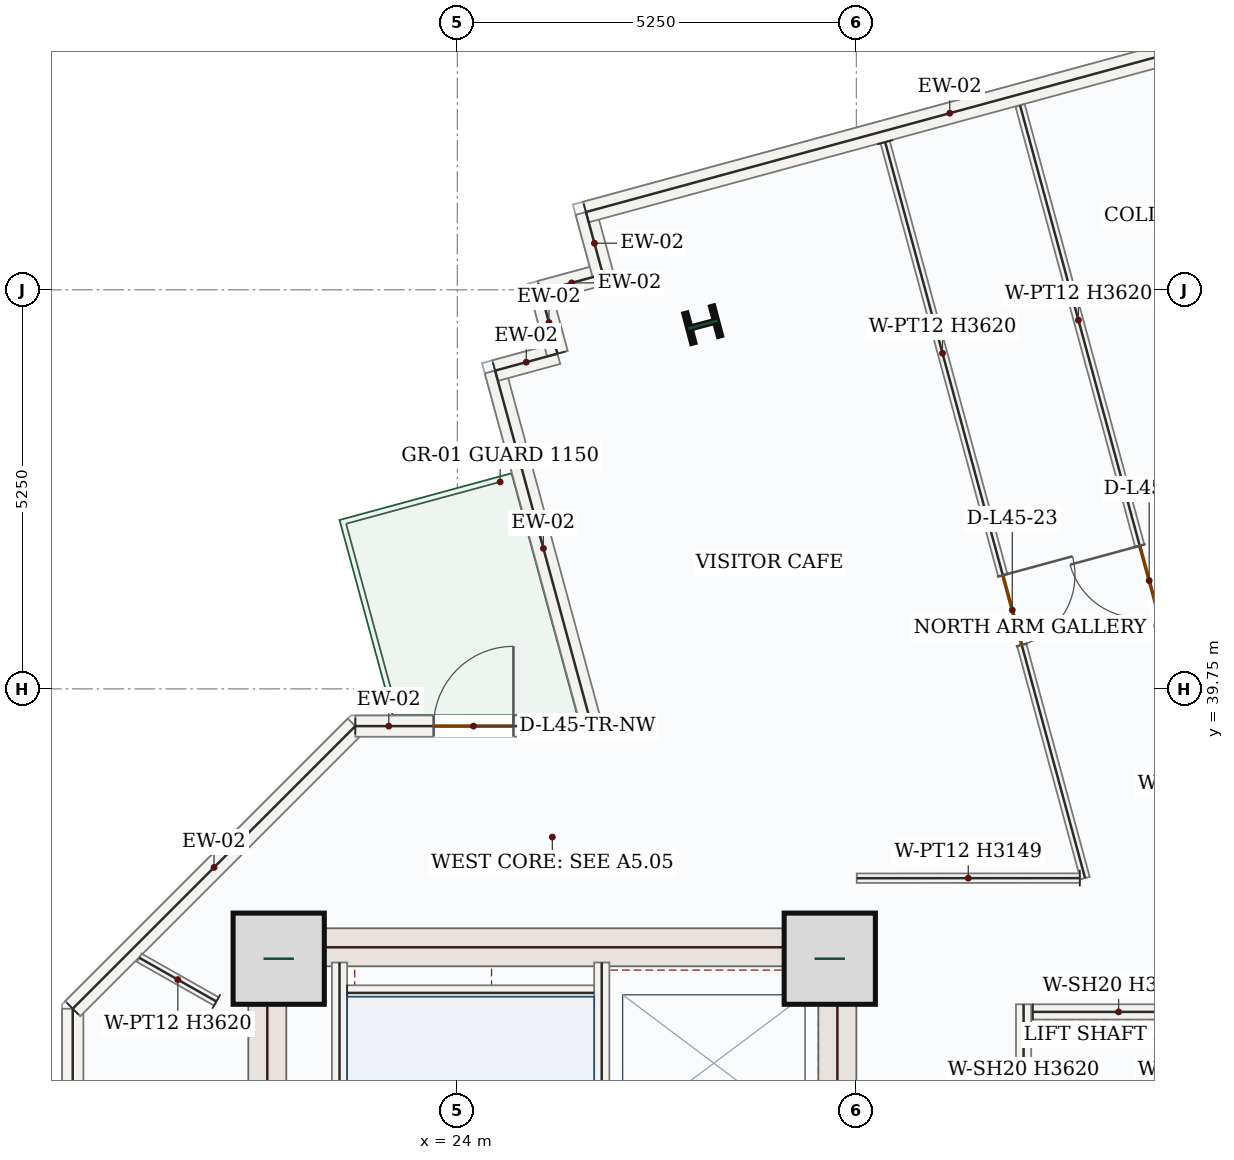
"""IFC4 building model, lengths in metres.
Left out: names, types, materials, properties, quantities, classifications, styles, units other than length and angle.
Written with IfcOpenShell. Run it as: python <this file> out.ifc"""

import sys

from ifc_helpers import new_model, si_unit, direction, frame, frame_2d, origin, origin_2d, place, context, subcontext, project, spatial, rectangle, i_section, extrude, source, transform, mapped, element, fill, save


model = new_model("IFC4")
c1 = context("Model", 3, precision=1e-05, world=origin(), true_north=direction((0.0, 1.0)))
c2 = subcontext(c1, "Body", "Model", "MODEL_VIEW")
j1 = project(units=[si_unit("LENGTHUNIT", "METRE"), si_unit("PLANEANGLEUNIT", "RADIAN")], contexts=[c1])
p1 = place(None, origin())
s1 = spatial("IfcSite", under=j1, at=p1, CompositionType="ELEMENT")
p2 = place(p1, origin())
s2 = spatial("IfcBuilding", under=s1, at=p2, CompositionType="ELEMENT")
p3 = place(p2, frame((0.0, 0.0, 194.1)))
s3 = spatial("IfcBuildingStorey", under=s2, at=p3, CompositionType="ELEMENT", Elevation=194.1)
m1 = source(origin(), c2, "Body", "SweptSolid", [
    extrude(rectangle(XDim=8.55, YDim=0.5, at=frame_2d((4.275, 0.0))), origin(), (0.0, 0.0, 1.0), 3.62),
])
p4 = place(p3, frame((21.5, 28.05, 0.0), z_axis=(0.0, 0.0, 1.0), x_axis=(0.0, 1.0, 0.0)))
e1 = element("IfcWall", 1, at=p4, inside=s3, PredefinedType="SHEAR", context=c2, shape_type="MappedRepresentation", body=[
    mapped(m1, transform((0.0, 0.0, 0.0), x_axis=(1.0, 0.0, 0.0), y_axis=(0.0, 1.0, 0.0), z_axis=(0.0, 0.0, 1.0), scale=1.0)),
])
p5 = place(p3, frame((29.0, 28.05, 0.0), z_axis=(0.0, 0.0, 1.0), x_axis=(0.0, 1.0, 0.0)))
e2 = element("IfcWall", 2, at=p5, inside=s3, PredefinedType="SHEAR", context=c2, shape_type="SweptSolid", body=[
    extrude(rectangle(XDim=8.55, YDim=0.5, at=frame_2d((4.275, 0.0))), origin(), (0.0, 0.0, 1.0), 3.62),
])
p6 = place(p5, frame((1.5, 0.0, 0.0)))
e3 = element("IfcOpeningElement", 3, at=p6, cuts=e2, PredefinedType="OPENING", context=c2, shape_type="SweptSolid", body=[
    extrude(rectangle(XDim=1.1, YDim=2.2, at=frame_2d((0.55, 1.1))), frame((0.0, 0.26, 0.0), z_axis=(0.0, -1.0, 0.0), x_axis=(1.0, 0.0, 0.0)), (0.0, 0.0, 1.0), 0.52),
])
m2 = source(origin(), c2, "Body", "SweptSolid", [
    extrude(rectangle(XDim=7.0, YDim=0.5, at=frame_2d((3.5, 0.0))), origin(), (0.0, 0.0, 1.0), 3.62),
])
p7 = place(p3, frame((21.75, 36.35, 0.0), z_axis=(0.0, 0.0, 1.0), x_axis=(1.0, 0.0, 0.0)))
e4 = element("IfcWall", 4, at=p7, inside=s3, PredefinedType="SHEAR", context=c2, shape_type="MappedRepresentation", body=[
    mapped(m2, transform((0.0, 0.0, 0.0), x_axis=(1.0, 0.0, 0.0), y_axis=(0.0, 1.0, 0.0), z_axis=(0.0, 0.0, 1.0), scale=1.0)),
])
m3 = source(origin(), c2, "Body", "SweptSolid", [
    extrude(rectangle(XDim=1.2, YDim=1.2, at=origin_2d()), origin(), (0.0, 0.0, 1.0), 3.9),
])
for number, where, z_axis, x_axis in (
    (5, (21.65, 36.2, 0.0), (0.0, 0.0, 1.0), (1.0, 0.0, 0.0)),
    (6, (28.9, 36.2, 0.0), (0.0, 0.0, 1.0), (1.0, 0.0, 0.0)),
):
    element("IfcColumn", number, at=place(p3, frame(where, z_axis=z_axis, x_axis=x_axis)), inside=s3, PredefinedType="COLUMN", context=c2, shape_type="MappedRepresentation", body=[
        mapped(m3, transform((0.0, 0.0, 0.0), x_axis=(1.0, 0.0, 0.0), y_axis=(0.0, 1.0, 0.0), z_axis=(0.0, 0.0, 1.0), scale=1.0)),
    ])
m4 = source(origin(), c2, "Body", "SweptSolid", [
    extrude(i_section(OverallWidth=0.404, OverallDepth=0.407, WebThickness=0.027, FlangeThickness=0.044, FilletRadius=0.018, at=origin_2d()), origin(), (0.0, 0.0, 1.0), 3.9),
])
p8 = place(p3, frame((27.228, 44.541, 0.0), z_axis=(0.0, 0.0, 1.0), x_axis=(-0.255445757936, 0.966823388604, 0.0)))
e7 = element("IfcColumn", 7, at=p8, inside=s3, PredefinedType="COLUMN", context=c2, shape_type="MappedRepresentation", body=[
    mapped(m4, transform((0.0, 0.0, 0.0), x_axis=(1.0, 0.0, 0.0), y_axis=(0.0, 1.0, 0.0), z_axis=(0.0, 0.0, 1.0), scale=1.0)),
])
m5 = source(origin(), c2, "Body", "SweptSolid", [
    extrude(rectangle(XDim=6.276, YDim=0.28, at=frame_2d((3.138, 0.0))), origin(), (0.0, 0.0, 1.0), 3.62),
])
p9 = place(p3, frame((18.94, 29.266, 0.0), z_axis=(0.0, 0.0, 1.0), x_axis=(0.0, 1.0, 0.0)))
e8 = element("IfcWall", 8, at=p9, inside=s3, PredefinedType="SOLIDWALL", context=c2, shape_type="MappedRepresentation", body=[
    mapped(m5, transform((0.0, 0.0, 0.0), x_axis=(1.0, 0.0, 0.0), y_axis=(0.0, 1.0, 0.0), z_axis=(0.0, 0.0, 1.0), scale=1.0)),
])
m6 = source(origin(), c2, "Body", "SweptSolid", [
    extrude(rectangle(XDim=5.258, YDim=0.28, at=frame_2d((2.629, 0.0))), origin(), (0.0, 0.0, 1.0), 3.62),
])
p10 = place(p3, frame((18.94, 35.542, 0.0), z_axis=(0.0, 0.0, 1.0), x_axis=(0.707106781187, 0.707106781187, 0.0)))
e9 = element("IfcWall", 9, at=p10, inside=s3, PredefinedType="SOLIDWALL", context=c2, shape_type="MappedRepresentation", body=[
    mapped(m6, transform((0.0, 0.0, 0.0), x_axis=(1.0, 0.0, 0.0), y_axis=(0.0, 1.0, 0.0), z_axis=(0.0, 0.0, 1.0), scale=1.0)),
])
p11 = place(p3, frame((22.658, 39.26, 0.0), z_axis=(0.0, 0.0, 1.0), x_axis=(1.0, 0.0, 0.0)))
e10 = element("IfcWall", 10, at=p11, inside=s3, PredefinedType="SOLIDWALL", context=c2, shape_type="SweptSolid", body=[
    extrude(rectangle(XDim=3.11, YDim=0.28, at=frame_2d((1.555, 0.0))), origin(), (0.0, 0.0, 1.0), 3.62),
])
p12 = place(p11, frame((1.03, 0.0, 0.0)))
e11 = element("IfcOpeningElement", 11, at=p12, cuts=e10, PredefinedType="OPENING", context=c2, shape_type="SweptSolid", body=[
    extrude(rectangle(XDim=1.05, YDim=2.15, at=frame_2d((0.525, 1.075))), frame((0.0, 0.15, 0.0), z_axis=(0.0, -1.0, 0.0), x_axis=(1.0, 0.0, 0.0)), (0.0, 0.0, 1.0), 0.3),
])
m7 = source(origin(), c2, "Body", "SweptSolid", [
    extrude(rectangle(XDim=4.846, YDim=0.28, at=frame_2d((2.423, 0.0))), origin(), (0.0, 0.0, 1.0), 3.62),
])
p13 = place(p3, frame((25.768, 39.26, 0.0), z_axis=(0.0, 0.0, 1.0), x_axis=(-0.262175182741, 0.965020296965, 0.0)))
e12 = element("IfcWall", 12, at=p13, inside=s3, PredefinedType="SOLIDWALL", context=c2, shape_type="MappedRepresentation", body=[
    mapped(m7, transform((0.0, 0.0, 0.0), x_axis=(1.0, 0.0, 0.0), y_axis=(0.0, 1.0, 0.0), z_axis=(0.0, 0.0, 1.0), scale=1.0)),
])
m8 = source(origin(), c2, "Body", "SweptSolid", [
    extrude(rectangle(XDim=0.85, YDim=0.28, at=frame_2d((0.425, 0.0))), origin(), (0.0, 0.0, 1.0), 3.62),
])
for number, where, z_axis, x_axis in (
    (13, (24.497, 43.937, 0.0), (0.0, 0.0, 1.0), (0.965, 0.262, 0.0)),
    (14, (25.317, 44.159, 0.0), (0.0, 0.0, 1.0), (-0.262, 0.965, 0.0)),
    (15, (25.094, 44.98, 0.0), (0.0, 0.0, 1.0), (0.965, 0.262, 0.0)),
    (16, (25.915, 45.202, 0.0), (0.0, 0.0, 1.0), (-0.262, 0.965, 0.0)),
):
    element("IfcWall", number, at=place(p3, frame(where, z_axis=z_axis, x_axis=x_axis)), inside=s3, PredefinedType="SOLIDWALL", context=c2, shape_type="MappedRepresentation", body=[
        mapped(m8, transform((0.0, 0.0, 0.0), x_axis=(1.0, 0.0, 0.0), y_axis=(0.0, 1.0, 0.0), z_axis=(0.0, 0.0, 1.0), scale=1.0)),
    ])
m9 = source(origin(), c2, "Body", "SweptSolid", [
    extrude(rectangle(XDim=9.92, YDim=0.28, at=frame_2d((4.96, 0.0))), origin(), (0.0, 0.0, 1.0), 3.62),
])
p14 = place(p3, frame((25.692, 46.023, 0.0), z_axis=(0.0, 0.0, 1.0), x_axis=(0.965012714082, 0.262203092393, 0.0)))
e17 = element("IfcWall", 17, at=p14, inside=s3, PredefinedType="SOLIDWALL", context=c2, shape_type="MappedRepresentation", body=[
    mapped(m9, transform((0.0, 0.0, 0.0), x_axis=(1.0, 0.0, 0.0), y_axis=(0.0, 1.0, 0.0), z_axis=(0.0, 0.0, 1.0), scale=1.0)),
])
m10 = source(origin(), c2, "Body", "SweptSolid", [
    extrude(rectangle(XDim=7.87, YDim=0.2, at=frame_2d((3.935, 0.0))), origin(), (0.0, 0.0, 1.0), 3.62),
])
p15 = place(p3, frame((22.45, 28.28, 0.0), z_axis=(0.0, 0.0, 1.0), x_axis=(0.0, 1.0, 0.0)))
e18 = element("IfcWall", 18, at=p15, inside=s3, PredefinedType="SOLIDWALL", context=c2, shape_type="MappedRepresentation", body=[
    mapped(m10, transform((0.0, 0.0, 0.0), x_axis=(1.0, 0.0, 0.0), y_axis=(0.0, 1.0, 0.0), z_axis=(0.0, 0.0, 1.0), scale=1.0)),
])
p16 = place(p3, frame((25.9, 28.15, 0.0), z_axis=(0.0, 0.0, 1.0), x_axis=(0.0, 1.0, 0.0)))
e19 = element("IfcWall", 19, at=p16, inside=s3, PredefinedType="SOLIDWALL", context=c2, shape_type="SweptSolid", body=[
    extrude(rectangle(XDim=8.0, YDim=0.2, at=frame_2d((4.0, 0.0))), origin(), (0.0, 0.0, 1.0), 3.62),
])
p17 = place(p16, frame((0.4, 0.0, 0.0)))
e20 = element("IfcOpeningElement", 20, at=p17, cuts=e19, PredefinedType="OPENING", context=c2, shape_type="SweptSolid", body=[
    extrude(rectangle(XDim=1.05, YDim=2.15, at=frame_2d((0.525, 1.075))), frame((0.0, 0.11, 0.0), z_axis=(0.0, -1.0, 0.0), x_axis=(1.0, 0.0, 0.0)), (0.0, 0.0, 1.0), 0.22),
])
m11 = source(origin(), c2, "Body", "SweptSolid", [
    extrude(rectangle(XDim=3.25, YDim=0.2, at=frame_2d((1.625, 0.0))), origin(), (0.0, 0.0, 1.0), 3.62),
])
p18 = place(p3, frame((22.55, 35.75, 0.0), z_axis=(0.0, 0.0, 1.0), x_axis=(1.0, 0.0, 0.0)))
e21 = element("IfcWall", 21, at=p18, inside=s3, PredefinedType="SOLIDWALL", context=c2, shape_type="MappedRepresentation", body=[
    mapped(m11, transform((0.0, 0.0, 0.0), x_axis=(1.0, 0.0, 0.0), y_axis=(0.0, 1.0, 0.0), z_axis=(0.0, 0.0, 1.0), scale=1.0)),
])
m12 = source(origin(), c2, "Body", "SweptSolid", [
    extrude(rectangle(XDim=2.4, YDim=0.2, at=frame_2d((1.2, 0.0))), origin(), (0.0, 0.0, 1.0), 3.62),
])
p19 = place(p3, frame((31.45, 33.2, 0.0), z_axis=(0.0, 0.0, 1.0), x_axis=(0.0, 1.0, 0.0)))
e22 = element("IfcWall", 22, at=p19, inside=s3, PredefinedType="SOLIDWALL", context=c2, shape_type="MappedRepresentation", body=[
    mapped(m12, transform((0.0, 0.0, 0.0), x_axis=(1.0, 0.0, 0.0), y_axis=(0.0, 1.0, 0.0), z_axis=(0.0, 0.0, 1.0), scale=1.0)),
])
m13 = source(origin(), c2, "Body", "SweptSolid", [
    extrude(rectangle(XDim=2.26, YDim=0.2, at=frame_2d((1.13, 0.0))), origin(), (0.0, 0.0, 1.0), 3.62),
])
p20 = place(p3, frame((31.57, 35.5, 0.0), z_axis=(0.0, 0.0, 1.0), x_axis=(1.0, 0.0, 0.0)))
e23 = element("IfcWall", 23, at=p20, inside=s3, PredefinedType="SOLIDWALL", context=c2, shape_type="MappedRepresentation", body=[
    mapped(m13, transform((0.0, 0.0, 0.0), x_axis=(1.0, 0.0, 0.0), y_axis=(0.0, 1.0, 0.0), z_axis=(0.0, 0.0, 1.0), scale=1.0)),
])
p21 = place(p3, frame((33.671, 39.082, 0.0), z_axis=(0.0, 0.0, 1.0), x_axis=(-0.262187726373, 0.965016889044, 0.0)))
e24 = element("IfcWall", 24, at=p21, inside=s3, PredefinedType="PARTITIONING", context=c2, shape_type="SweptSolid", body=[
    extrude(rectangle(XDim=8.645, YDim=0.125, at=frame_2d((4.323, 0.0))), origin(), (0.0, 0.0, 1.0), 3.62),
])
p22 = place(p21, frame((1.693, 0.0, 0.0)))
e25 = element("IfcOpeningElement", 25, at=p22, cuts=e24, PredefinedType="OPENING", context=c2, shape_type="SweptSolid", body=[
    extrude(rectangle(XDim=0.95, YDim=2.15, at=frame_2d((0.475, 1.075))), frame((0.0, 0.073, 0.0), z_axis=(0.0, -1.0, 0.0), x_axis=(1.0, 0.0, 0.0)), (0.0, 0.0, 1.0), 0.145),
])
p23 = place(p3, frame((29.628, 46.942, 0.0), z_axis=(0.0, 0.0, 1.0), x_axis=(0.262192801501, -0.965015510156, 0.0)))
e26 = element("IfcWall", 26, at=p23, inside=s3, PredefinedType="PARTITIONING", context=c2, shape_type="SweptSolid", body=[
    extrude(rectangle(XDim=10.033, YDim=0.125, at=frame_2d((5.017, 0.0))), origin(), (0.0, 0.0, 1.0), 3.62),
])
p24 = place(p23, frame((5.904, 0.0, 0.0)))
e27 = element("IfcOpeningElement", 27, at=p24, cuts=e26, PredefinedType="OPENING", context=c2, shape_type="SweptSolid", body=[
    extrude(rectangle(XDim=0.95, YDim=2.15, at=frame_2d((0.475, 1.075))), frame((0.0, 0.073, 0.0), z_axis=(0.0, -1.0, 0.0), x_axis=(1.0, 0.0, 0.0)), (0.0, 0.0, 1.0), 0.145),
])
m14 = source(origin(), c2, "Body", "SweptSolid", [
    extrude(rectangle(XDim=2.934, YDim=0.125, at=frame_2d((1.467, 0.0))), origin(), (0.0, 0.0, 1.0), 3.149),
])
p25 = place(p3, frame((32.189, 37.26, 0.0), z_axis=(0.0, 0.0, 1.0), x_axis=(-0.999999913469, -0.000416007951, 0.0)))
e28 = element("IfcWall", 28, at=p25, inside=s3, PredefinedType="PARTITIONING", context=c2, shape_type="MappedRepresentation", body=[
    mapped(m14, transform((0.0, 0.0, 0.0), x_axis=(1.0, 0.0, 0.0), y_axis=(0.0, 1.0, 0.0), z_axis=(0.0, 0.0, 1.0), scale=1.0)),
])
m15 = source(origin(), c2, "Body", "SweptSolid", [
    extrude(rectangle(XDim=1.166, YDim=0.125, at=frame_2d((0.583, 0.0))), origin(), (0.0, 0.0, 1.0), 3.62),
])
p26 = place(p3, frame((20.83, 35.638, 0.0), z_axis=(0.0, 0.0, 1.0), x_axis=(-0.870117959309, 0.492843521707, 0.0)))
e29 = element("IfcWall", 29, at=p26, inside=s3, PredefinedType="PARTITIONING", context=c2, shape_type="MappedRepresentation", body=[
    mapped(m15, transform((0.0, 0.0, 0.0), x_axis=(1.0, 0.0, 0.0), y_axis=(0.0, 1.0, 0.0), z_axis=(0.0, 0.0, 1.0), scale=1.0)),
])
m16 = source(origin(), c2, "Body", "SweptSolid", [
    extrude(rectangle(XDim=1.05, YDim=2.15, at=frame_2d((0.525, 1.075))), frame((0.0, 0.025, 0.0), z_axis=(0.0, -1.0, 0.0), x_axis=(1.0, 0.0, 0.0)), (0.0, 0.0, 1.0), 0.05),
])
p27 = place(p12, origin())
e30 = element("IfcDoor", 30, at=p27, inside=s3, OperationType="SINGLE_SWING_RIGHT", PredefinedType="DOOR", context=c2, shape_type="MappedRepresentation", body=[
    mapped(m16, transform((0.0, 0.0, 0.0), x_axis=(1.0, 0.0, 0.0), y_axis=(0.0, 1.0, 0.0), z_axis=(0.0, 0.0, 1.0), scale=1.0)),
])
fill(e11, e30)
m17 = source(origin(), c2, "Body", "SweptSolid", [
    extrude(rectangle(XDim=0.95, YDim=2.15, at=frame_2d((0.475, 1.075))), frame((0.0, 0.025, 0.0), z_axis=(0.0, -1.0, 0.0), x_axis=(1.0, 0.0, 0.0)), (0.0, 0.0, 1.0), 0.05),
])
p28 = place(p22, origin())
e31 = element("IfcDoor", 31, at=p28, inside=s3, OperationType="SINGLE_SWING_RIGHT", PredefinedType="DOOR", context=c2, shape_type="MappedRepresentation", body=[
    mapped(m17, transform((0.0, 0.0, 0.0), x_axis=(1.0, 0.0, 0.0), y_axis=(0.0, 1.0, 0.0), z_axis=(0.0, 0.0, 1.0), scale=1.0)),
])
fill(e25, e31)
p29 = place(p24, origin())
e32 = element("IfcDoor", 32, at=p29, inside=s3, OperationType="SINGLE_SWING_LEFT", PredefinedType="DOOR", context=c2, shape_type="MappedRepresentation", body=[
    mapped(m17, transform((0.0, 0.0, 0.0), x_axis=(1.0, 0.0, 0.0), y_axis=(0.0, 1.0, 0.0), z_axis=(0.0, 0.0, 1.0), scale=1.0)),
])
fill(e27, e32)
save(model, sys.argv[1])
